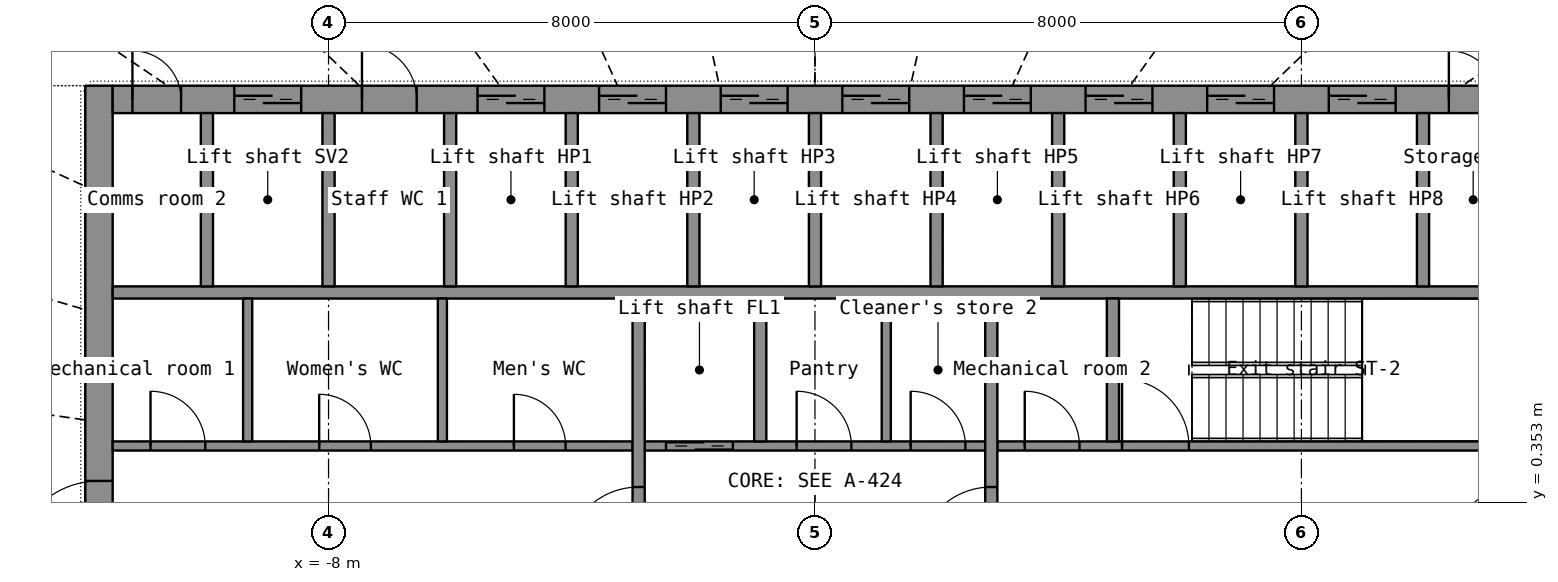
"""IFC4 building model, lengths in metres.
Left out: names, types, materials, properties, quantities, classifications, styles, units other than length and angle.
Written with IfcOpenShell. Run it as: python <this file> out.ifc"""

import sys

from ifc_helpers import new_model, si_unit, direction, frame, frame_2d, origin, place, context, subcontext, project, spatial, rectangle, extrude, element, fill, save


model = new_model("IFC4")
c1 = context("Model", 3, precision=1e-05, world=origin(), true_north=direction((0.0, 1.0)))
c2 = subcontext(c1, "Body", "Model", "MODEL_VIEW")
j1 = project(units=[si_unit("LENGTHUNIT", "METRE"), si_unit("PLANEANGLEUNIT", "RADIAN")], contexts=[c1])
p1 = place(None, origin())
s1 = spatial("IfcSite", under=j1, at=p1, CompositionType="ELEMENT")
p2 = place(p1, origin())
s2 = spatial("IfcBuilding", under=s1, at=p2, CompositionType="ELEMENT")
p3 = place(p2, frame((0.0, 0.0, 186.7)))
s3 = spatial("IfcBuildingStorey", under=s2, at=p3, CompositionType="ELEMENT", Elevation=186.7)
p4 = place(p3, frame((-11.775, -7.2, 0.0), z_axis=(0.0, 0.0, 1.0), x_axis=(0.0, 1.0, 0.0)))
e1 = element("IfcWall", 1, at=p4, inside=s3, PredefinedType="SHEAR", context=c2, shape_type="SweptSolid", body=[
    extrude(rectangle(XDim=14.4, YDim=0.45, at=frame_2d((7.2, 0.0))), origin(), (0.0, 0.0, 1.0), 3.3),
])
p5 = place(p4, frame((6.5, 0.0, 0.0)))
e2 = element("IfcOpeningElement", 2, at=p5, cuts=e1, PredefinedType="OPENING", context=c2, shape_type="SweptSolid", body=[
    extrude(rectangle(XDim=1.4, YDim=2.2, at=frame_2d((0.7, 1.1))), frame((0.0, 0.235, 0.0), z_axis=(0.0, -1.0, 0.0), x_axis=(1.0, 0.0, 0.0)), (0.0, 0.0, 1.0), 0.47),
])
p6 = place(p3, frame((-11.55, 6.975, 0.0), z_axis=(0.0, 0.0, 1.0), x_axis=(1.0, 0.0, 0.0)))
e3 = element("IfcWall", 3, at=p6, inside=s3, PredefinedType="SHEAR", context=c2, shape_type="SweptSolid", body=[
    extrude(rectangle(XDim=23.1, YDim=0.45, at=frame_2d((11.55, 0.0))), origin(), (0.0, 0.0, 1.0), 3.3),
])
p7 = place(p6, frame((2.0, 0.0, 0.0)))
e4 = element("IfcOpeningElement", 4, at=p7, cuts=e3, PredefinedType="OPENING", context=c2, shape_type="SweptSolid", body=[
    extrude(rectangle(XDim=1.1, YDim=2.2, at=frame_2d((0.55, 1.1))), frame((0.0, 0.235, 0.0), z_axis=(0.0, -1.0, 0.0), x_axis=(1.0, 0.0, 0.0)), (0.0, 0.0, 1.0), 0.47),
])
p8 = place(p6, frame((6.0, 0.0, 0.0)))
e5 = element("IfcOpeningElement", 5, at=p8, cuts=e3, PredefinedType="OPENING", context=c2, shape_type="SweptSolid", body=[
    extrude(rectangle(XDim=1.1, YDim=2.2, at=frame_2d((0.55, 1.1))), frame((0.0, 0.235, 0.0), z_axis=(0.0, -1.0, 0.0), x_axis=(1.0, 0.0, 0.0)), (0.0, 0.0, 1.0), 0.47),
])
p9 = place(p6, frame((8.0, 0.0, 0.0)))
e6 = element("IfcOpeningElement", 6, at=p9, cuts=e3, PredefinedType="OPENING", context=c2, shape_type="SweptSolid", body=[
    extrude(rectangle(XDim=1.1, YDim=2.2, at=frame_2d((0.55, 1.1))), frame((0.0, 0.235, 0.0), z_axis=(0.0, -1.0, 0.0), x_axis=(1.0, 0.0, 0.0)), (0.0, 0.0, 1.0), 0.47),
])
p10 = place(p6, frame((10.0, 0.0, 0.0)))
e7 = element("IfcOpeningElement", 7, at=p10, cuts=e3, PredefinedType="OPENING", context=c2, shape_type="SweptSolid", body=[
    extrude(rectangle(XDim=1.1, YDim=2.2, at=frame_2d((0.55, 1.1))), frame((0.0, 0.235, 0.0), z_axis=(0.0, -1.0, 0.0), x_axis=(1.0, 0.0, 0.0)), (0.0, 0.0, 1.0), 0.47),
])
p11 = place(p6, frame((12.0, 0.0, 0.0)))
e8 = element("IfcOpeningElement", 8, at=p11, cuts=e3, PredefinedType="OPENING", context=c2, shape_type="SweptSolid", body=[
    extrude(rectangle(XDim=1.1, YDim=2.2, at=frame_2d((0.55, 1.1))), frame((0.0, 0.235, 0.0), z_axis=(0.0, -1.0, 0.0), x_axis=(1.0, 0.0, 0.0)), (0.0, 0.0, 1.0), 0.47),
])
p12 = place(p6, frame((14.0, 0.0, 0.0)))
e9 = element("IfcOpeningElement", 9, at=p12, cuts=e3, PredefinedType="OPENING", context=c2, shape_type="SweptSolid", body=[
    extrude(rectangle(XDim=1.1, YDim=2.2, at=frame_2d((0.55, 1.1))), frame((0.0, 0.235, 0.0), z_axis=(0.0, -1.0, 0.0), x_axis=(1.0, 0.0, 0.0)), (0.0, 0.0, 1.0), 0.47),
])
p13 = place(p6, frame((16.0, 0.0, 0.0)))
e10 = element("IfcOpeningElement", 10, at=p13, cuts=e3, PredefinedType="OPENING", context=c2, shape_type="SweptSolid", body=[
    extrude(rectangle(XDim=1.1, YDim=2.2, at=frame_2d((0.55, 1.1))), frame((0.0, 0.235, 0.0), z_axis=(0.0, -1.0, 0.0), x_axis=(1.0, 0.0, 0.0)), (0.0, 0.0, 1.0), 0.47),
])
p14 = place(p6, frame((18.0, 0.0, 0.0)))
e11 = element("IfcOpeningElement", 11, at=p14, cuts=e3, PredefinedType="OPENING", context=c2, shape_type="SweptSolid", body=[
    extrude(rectangle(XDim=1.1, YDim=2.2, at=frame_2d((0.55, 1.1))), frame((0.0, 0.235, 0.0), z_axis=(0.0, -1.0, 0.0), x_axis=(1.0, 0.0, 0.0)), (0.0, 0.0, 1.0), 0.47),
])
p15 = place(p6, frame((20.0, 0.0, 0.0)))
e12 = element("IfcOpeningElement", 12, at=p15, cuts=e3, PredefinedType="OPENING", context=c2, shape_type="SweptSolid", body=[
    extrude(rectangle(XDim=1.1, YDim=2.2, at=frame_2d((0.55, 1.1))), frame((0.0, 0.235, 0.0), z_axis=(0.0, -1.0, 0.0), x_axis=(1.0, 0.0, 0.0)), (0.0, 0.0, 1.0), 0.47),
])
p16 = place(p6, frame((4.1, 0.0, 0.0)))
e13 = element("IfcOpeningElement", 13, at=p16, cuts=e3, PredefinedType="OPENING", context=c2, shape_type="SweptSolid", body=[
    extrude(rectangle(XDim=0.9, YDim=2.1, at=frame_2d((0.45, 1.05))), frame((0.0, 0.235, 0.0), z_axis=(0.0, -1.0, 0.0), x_axis=(1.0, 0.0, 0.0)), (0.0, 0.0, 1.0), 0.47),
])
p17 = place(p6, frame((0.325, 0.0, 0.0)))
e14 = element("IfcOpeningElement", 14, at=p17, cuts=e3, PredefinedType="OPENING", context=c2, shape_type="SweptSolid", body=[
    extrude(rectangle(XDim=0.8, YDim=2.05, at=frame_2d((0.4, 1.025))), frame((0.0, 0.235, 0.0), z_axis=(0.0, -1.0, 0.0), x_axis=(1.0, 0.0, 0.0)), (0.0, 0.0, 1.0), 0.47),
])
p18 = place(p6, frame((21.975, 0.0, 0.0)))
e15 = element("IfcOpeningElement", 15, at=p18, cuts=e3, PredefinedType="OPENING", context=c2, shape_type="SweptSolid", body=[
    extrude(rectangle(XDim=0.8, YDim=2.05, at=frame_2d((0.4, 1.025))), frame((0.0, 0.235, 0.0), z_axis=(0.0, -1.0, 0.0), x_axis=(1.0, 0.0, 0.0)), (0.0, 0.0, 1.0), 0.47),
])
p19 = place(p3, frame((-11.55, 3.8, 0.0), z_axis=(0.0, 0.0, 1.0), x_axis=(1.0, 0.0, 0.0)))
e16 = element("IfcWall", 16, at=p19, inside=s3, PredefinedType="SHEAR", context=c2, shape_type="SweptSolid", body=[
    extrude(rectangle(XDim=23.1, YDim=0.2, at=frame_2d((11.55, 0.0))), origin(), (0.0, 0.0, 1.0), 3.3),
])
for number, where, z_axis, x_axis in (
    (17, (-10.0, 3.9, 0.0), (0.0, 0.0, 1.0), (0.0, 1.0, 0.0)),
    (18, (-8.0, 3.9, 0.0), (0.0, 0.0, 1.0), (0.0, 1.0, 0.0)),
    (19, (-6.0, 3.9, 0.0), (0.0, 0.0, 1.0), (0.0, 1.0, 0.0)),
    (20, (-4.0, 3.9, 0.0), (0.0, 0.0, 1.0), (0.0, 1.0, 0.0)),
    (21, (-2.0, 3.9, 0.0), (0.0, 0.0, 1.0), (0.0, 1.0, 0.0)),
    (22, (0.0, 3.9, 0.0), (0.0, 0.0, 1.0), (0.0, 1.0, 0.0)),
    (23, (2.0, 3.9, 0.0), (0.0, 0.0, 1.0), (0.0, 1.0, 0.0)),
    (24, (4.0, 3.9, 0.0), (0.0, 0.0, 1.0), (0.0, 1.0, 0.0)),
    (25, (6.0, 3.9, 0.0), (0.0, 0.0, 1.0), (0.0, 1.0, 0.0)),
    (26, (8.0, 3.9, 0.0), (0.0, 0.0, 1.0), (0.0, 1.0, 0.0)),
    (27, (10.0, 3.9, 0.0), (0.0, 0.0, 1.0), (0.0, 1.0, 0.0)),
):
    element("IfcWall", number, at=place(p3, frame(where, z_axis=z_axis, x_axis=x_axis)), inside=s3, PredefinedType="SHEAR", context=c2, shape_type="SweptSolid", body=[
        extrude(rectangle(XDim=2.85, YDim=0.2, at=frame_2d((1.425, 0.0))), origin(), (0.0, 0.0, 1.0), 3.3),
    ])
p20 = place(p3, frame((-11.55, 1.275, 0.0), z_axis=(0.0, 0.0, 1.0), x_axis=(1.0, 0.0, 0.0)))
e28 = element("IfcWall", 28, at=p20, inside=s3, PredefinedType="PARTITIONING", context=c2, shape_type="SweptSolid", body=[
    extrude(rectangle(XDim=8.55, YDim=0.15, at=frame_2d((4.275, 0.0))), origin(), (0.0, 0.0, 1.0), 3.3),
])
p21 = place(p20, frame((0.623, 0.0, 0.0)))
e29 = element("IfcOpeningElement", 29, at=p21, cuts=e28, PredefinedType="OPENING", context=c2, shape_type="SweptSolid", body=[
    extrude(rectangle(XDim=0.9, YDim=2.1, at=frame_2d((0.45, 1.05))), frame((0.0, 0.085, 0.0), z_axis=(0.0, -1.0, 0.0), x_axis=(1.0, 0.0, 0.0)), (0.0, 0.0, 1.0), 0.17),
])
p22 = place(p20, frame((3.396, 0.0, 0.0)))
e30 = element("IfcOpeningElement", 30, at=p22, cuts=e28, PredefinedType="OPENING", context=c2, shape_type="SweptSolid", body=[
    extrude(rectangle(XDim=0.85, YDim=2.1, at=frame_2d((0.425, 1.05))), frame((0.0, 0.085, 0.0), z_axis=(0.0, -1.0, 0.0), x_axis=(1.0, 0.0, 0.0)), (0.0, 0.0, 1.0), 0.17),
])
p23 = place(p20, frame((6.599, 0.0, 0.0)))
e31 = element("IfcOpeningElement", 31, at=p23, cuts=e28, PredefinedType="OPENING", context=c2, shape_type="SweptSolid", body=[
    extrude(rectangle(XDim=0.85, YDim=2.1, at=frame_2d((0.425, 1.05))), frame((0.0, 0.085, 0.0), z_axis=(0.0, -1.0, 0.0), x_axis=(1.0, 0.0, 0.0)), (0.0, 0.0, 1.0), 0.17),
])
p24 = place(p3, frame((-2.8, 1.275, 0.0), z_axis=(0.0, 0.0, 1.0), x_axis=(1.0, 0.0, 0.0)))
e32 = element("IfcWall", 32, at=p24, inside=s3, PredefinedType="SHEAR", context=c2, shape_type="SweptSolid", body=[
    extrude(rectangle(XDim=5.6, YDim=0.15, at=frame_2d((2.8, 0.0))), origin(), (0.0, 0.0, 1.0), 3.3),
])
p25 = place(p24, frame((0.35, 0.0, 0.0)))
e33 = element("IfcOpeningElement", 33, at=p25, cuts=e32, PredefinedType="OPENING", context=c2, shape_type="SweptSolid", body=[
    extrude(rectangle(XDim=1.1, YDim=2.2, at=frame_2d((0.55, 1.1))), frame((0.0, 0.085, 0.0), z_axis=(0.0, -1.0, 0.0), x_axis=(1.0, 0.0, 0.0)), (0.0, 0.0, 1.0), 0.17),
])
p26 = place(p24, frame((2.499, 0.0, 0.0)))
e34 = element("IfcOpeningElement", 34, at=p26, cuts=e32, PredefinedType="OPENING", context=c2, shape_type="SweptSolid", body=[
    extrude(rectangle(XDim=0.9, YDim=2.1, at=frame_2d((0.45, 1.05))), frame((0.0, 0.085, 0.0), z_axis=(0.0, -1.0, 0.0), x_axis=(1.0, 0.0, 0.0)), (0.0, 0.0, 1.0), 0.17),
])
p27 = place(p24, frame((4.374, 0.0, 0.0)))
e35 = element("IfcOpeningElement", 35, at=p27, cuts=e32, PredefinedType="OPENING", context=c2, shape_type="SweptSolid", body=[
    extrude(rectangle(XDim=0.9, YDim=2.1, at=frame_2d((0.45, 1.05))), frame((0.0, 0.085, 0.0), z_axis=(0.0, -1.0, 0.0), x_axis=(1.0, 0.0, 0.0)), (0.0, 0.0, 1.0), 0.17),
])
p28 = place(p3, frame((3.0, 1.275, 0.0), z_axis=(0.0, 0.0, 1.0), x_axis=(1.0, 0.0, 0.0)))
e36 = element("IfcWall", 36, at=p28, inside=s3, PredefinedType="SHEAR", context=c2, shape_type="SweptSolid", body=[
    extrude(rectangle(XDim=8.55, YDim=0.15, at=frame_2d((4.275, 0.0))), origin(), (0.0, 0.0, 1.0), 3.3),
])
p29 = place(p28, frame((2.05, 0.0, 0.0)))
e37 = element("IfcOpeningElement", 37, at=p29, cuts=e36, PredefinedType="OPENING", context=c2, shape_type="SweptSolid", body=[
    extrude(rectangle(XDim=1.1, YDim=2.15, at=frame_2d((0.55, 1.075))), frame((0.0, 0.085, 0.0), z_axis=(0.0, -1.0, 0.0), x_axis=(1.0, 0.0, 0.0)), (0.0, 0.0, 1.0), 0.17),
])
p30 = place(p28, frame((0.45, 0.0, 0.0)))
e38 = element("IfcOpeningElement", 38, at=p30, cuts=e36, PredefinedType="OPENING", context=c2, shape_type="SweptSolid", body=[
    extrude(rectangle(XDim=0.9, YDim=2.1, at=frame_2d((0.45, 1.05))), frame((0.0, 0.085, 0.0), z_axis=(0.0, -1.0, 0.0), x_axis=(1.0, 0.0, 0.0)), (0.0, 0.0, 1.0), 0.17),
])
p31 = place(p3, frame((-2.9, -3.7, 0.0), z_axis=(0.0, 0.0, 1.0), x_axis=(0.0, 1.0, 0.0)))
e39 = element("IfcWall", 39, at=p31, inside=s3, PredefinedType="SHEAR", context=c2, shape_type="SweptSolid", body=[
    extrude(rectangle(XDim=7.4, YDim=0.2, at=frame_2d((3.7, 0.0))), origin(), (0.0, 0.0, 1.0), 3.3),
])
p32 = place(p31, frame((3.1, 0.0, 0.0)))
e40 = element("IfcOpeningElement", 40, at=p32, cuts=e39, PredefinedType="OPENING", context=c2, shape_type="SweptSolid", body=[
    extrude(rectangle(XDim=1.2, YDim=2.2, at=frame_2d((0.6, 1.1))), frame((0.0, 0.11, 0.0), z_axis=(0.0, -1.0, 0.0), x_axis=(1.0, 0.0, 0.0)), (0.0, 0.0, 1.0), 0.22),
])
p33 = place(p3, frame((2.9, -3.7, 0.0), z_axis=(0.0, 0.0, 1.0), x_axis=(0.0, 1.0, 0.0)))
e41 = element("IfcWall", 41, at=p33, inside=s3, PredefinedType="SHEAR", context=c2, shape_type="SweptSolid", body=[
    extrude(rectangle(XDim=7.4, YDim=0.2, at=frame_2d((3.7, 0.0))), origin(), (0.0, 0.0, 1.0), 3.3),
])
p34 = place(p33, frame((3.1, 0.0, 0.0)))
e42 = element("IfcOpeningElement", 42, at=p34, cuts=e41, PredefinedType="OPENING", context=c2, shape_type="SweptSolid", body=[
    extrude(rectangle(XDim=1.2, YDim=2.2, at=frame_2d((0.6, 1.1))), frame((0.0, 0.11, 0.0), z_axis=(0.0, -1.0, 0.0), x_axis=(1.0, 0.0, 0.0)), (0.0, 0.0, 1.0), 0.22),
])
for number, where, z_axis, x_axis in (
    (43, (-0.9, 1.35, 0.0), (0.0, 0.0, 1.0), (0.0, 1.0, 0.0)),
    (44, (4.9, 1.35, 0.0), (0.0, 0.0, 1.0), (0.0, 1.0, 0.0)),
):
    element("IfcWall", number, at=place(p3, frame(where, z_axis=z_axis, x_axis=x_axis)), inside=s3, PredefinedType="SHEAR", context=c2, shape_type="SweptSolid", body=[
        extrude(rectangle(XDim=2.35, YDim=0.2, at=frame_2d((1.175, 0.0))), origin(), (0.0, 0.0, 1.0), 3.3),
    ])
for number, where, z_axis, x_axis in (
    (45, (-9.33, 1.35, 0.0), (0.0, 0.0, 1.0), (0.0, 1.0, 0.0)),
    (46, (-6.127, 1.35, 0.0), (0.0, 0.0, 1.0), (0.0, 1.0, 0.0)),
    (47, (1.173, 1.35, 0.0), (0.0, 0.0, 1.0), (0.0, 1.0, 0.0)),
):
    element("IfcWall", number, at=place(p3, frame(where, z_axis=z_axis, x_axis=x_axis)), inside=s3, PredefinedType="PARTITIONING", context=c2, shape_type="SweptSolid", body=[
        extrude(rectangle(XDim=2.35, YDim=0.15, at=frame_2d((1.175, 0.0))), origin(), (0.0, 0.0, 1.0), 3.3),
    ])
p35 = place(p7, origin())
e48 = element("IfcDoor", 48, at=p35, inside=s3, OperationType="DOUBLE_DOOR_SLIDING", PredefinedType="DOOR", context=c2, shape_type="SweptSolid", body=[
    extrude(rectangle(XDim=1.1, YDim=2.2, at=frame_2d((0.55, 1.1))), frame((0.0, 0.025, 0.0), z_axis=(0.0, -1.0, 0.0), x_axis=(1.0, 0.0, 0.0)), (0.0, 0.0, 1.0), 0.05),
])
fill(e4, e48)
p36 = place(p8, origin())
e49 = element("IfcDoor", 49, at=p36, inside=s3, OperationType="DOUBLE_DOOR_SLIDING", PredefinedType="DOOR", context=c2, shape_type="SweptSolid", body=[
    extrude(rectangle(XDim=1.1, YDim=2.2, at=frame_2d((0.55, 1.1))), frame((0.0, 0.025, 0.0), z_axis=(0.0, -1.0, 0.0), x_axis=(1.0, 0.0, 0.0)), (0.0, 0.0, 1.0), 0.05),
])
fill(e5, e49)
p37 = place(p9, origin())
e50 = element("IfcDoor", 50, at=p37, inside=s3, OperationType="DOUBLE_DOOR_SLIDING", PredefinedType="DOOR", context=c2, shape_type="SweptSolid", body=[
    extrude(rectangle(XDim=1.1, YDim=2.2, at=frame_2d((0.55, 1.1))), frame((0.0, 0.025, 0.0), z_axis=(0.0, -1.0, 0.0), x_axis=(1.0, 0.0, 0.0)), (0.0, 0.0, 1.0), 0.05),
])
fill(e6, e50)
p38 = place(p10, origin())
e51 = element("IfcDoor", 51, at=p38, inside=s3, OperationType="DOUBLE_DOOR_SLIDING", PredefinedType="DOOR", context=c2, shape_type="SweptSolid", body=[
    extrude(rectangle(XDim=1.1, YDim=2.2, at=frame_2d((0.55, 1.1))), frame((0.0, 0.025, 0.0), z_axis=(0.0, -1.0, 0.0), x_axis=(1.0, 0.0, 0.0)), (0.0, 0.0, 1.0), 0.05),
])
fill(e7, e51)
p39 = place(p11, origin())
e52 = element("IfcDoor", 52, at=p39, inside=s3, OperationType="DOUBLE_DOOR_SLIDING", PredefinedType="DOOR", context=c2, shape_type="SweptSolid", body=[
    extrude(rectangle(XDim=1.1, YDim=2.2, at=frame_2d((0.55, 1.1))), frame((0.0, 0.025, 0.0), z_axis=(0.0, -1.0, 0.0), x_axis=(1.0, 0.0, 0.0)), (0.0, 0.0, 1.0), 0.05),
])
fill(e8, e52)
p40 = place(p12, origin())
e53 = element("IfcDoor", 53, at=p40, inside=s3, OperationType="DOUBLE_DOOR_SLIDING", PredefinedType="DOOR", context=c2, shape_type="SweptSolid", body=[
    extrude(rectangle(XDim=1.1, YDim=2.2, at=frame_2d((0.55, 1.1))), frame((0.0, 0.025, 0.0), z_axis=(0.0, -1.0, 0.0), x_axis=(1.0, 0.0, 0.0)), (0.0, 0.0, 1.0), 0.05),
])
fill(e9, e53)
p41 = place(p13, origin())
e54 = element("IfcDoor", 54, at=p41, inside=s3, OperationType="DOUBLE_DOOR_SLIDING", PredefinedType="DOOR", context=c2, shape_type="SweptSolid", body=[
    extrude(rectangle(XDim=1.1, YDim=2.2, at=frame_2d((0.55, 1.1))), frame((0.0, 0.025, 0.0), z_axis=(0.0, -1.0, 0.0), x_axis=(1.0, 0.0, 0.0)), (0.0, 0.0, 1.0), 0.05),
])
fill(e10, e54)
p42 = place(p14, origin())
e55 = element("IfcDoor", 55, at=p42, inside=s3, OperationType="DOUBLE_DOOR_SLIDING", PredefinedType="DOOR", context=c2, shape_type="SweptSolid", body=[
    extrude(rectangle(XDim=1.1, YDim=2.2, at=frame_2d((0.55, 1.1))), frame((0.0, 0.025, 0.0), z_axis=(0.0, -1.0, 0.0), x_axis=(1.0, 0.0, 0.0)), (0.0, 0.0, 1.0), 0.05),
])
fill(e11, e55)
p43 = place(p15, origin())
e56 = element("IfcDoor", 56, at=p43, inside=s3, OperationType="DOUBLE_DOOR_SLIDING", PredefinedType="DOOR", context=c2, shape_type="SweptSolid", body=[
    extrude(rectangle(XDim=1.1, YDim=2.2, at=frame_2d((0.55, 1.1))), frame((0.0, 0.025, 0.0), z_axis=(0.0, -1.0, 0.0), x_axis=(1.0, 0.0, 0.0)), (0.0, 0.0, 1.0), 0.05),
])
fill(e12, e56)
p44 = place(p16, origin())
e57 = element("IfcDoor", 57, at=p44, inside=s3, OperationType="SINGLE_SWING_LEFT", PredefinedType="DOOR", context=c2, shape_type="SweptSolid", body=[
    extrude(rectangle(XDim=0.9, YDim=2.1, at=frame_2d((0.45, 1.05))), frame((0.0, 0.025, 0.0), z_axis=(0.0, -1.0, 0.0), x_axis=(1.0, 0.0, 0.0)), (0.0, 0.0, 1.0), 0.05),
])
fill(e13, e57)
p45 = place(p17, origin())
e58 = element("IfcDoor", 58, at=p45, inside=s3, OperationType="SINGLE_SWING_LEFT", PredefinedType="DOOR", context=c2, shape_type="SweptSolid", body=[
    extrude(rectangle(XDim=0.8, YDim=2.05, at=frame_2d((0.4, 1.025))), frame((0.0, 0.025, 0.0), z_axis=(0.0, -1.0, 0.0), x_axis=(1.0, 0.0, 0.0)), (0.0, 0.0, 1.0), 0.05),
])
fill(e14, e58)
p46 = place(p18, origin())
e59 = element("IfcDoor", 59, at=p46, inside=s3, OperationType="SINGLE_SWING_LEFT", PredefinedType="DOOR", context=c2, shape_type="SweptSolid", body=[
    extrude(rectangle(XDim=0.8, YDim=2.05, at=frame_2d((0.4, 1.025))), frame((0.0, 0.025, 0.0), z_axis=(0.0, -1.0, 0.0), x_axis=(1.0, 0.0, 0.0)), (0.0, 0.0, 1.0), 0.05),
])
fill(e15, e59)
p47 = place(p5, origin())
e60 = element("IfcDoor", 60, at=p47, inside=s3, OperationType="DOUBLE_DOOR_SINGLE_SWING", PredefinedType="DOOR", context=c2, shape_type="SweptSolid", body=[
    extrude(rectangle(XDim=1.4, YDim=2.2, at=frame_2d((0.7, 1.1))), frame((0.0, 0.025, 0.0), z_axis=(0.0, -1.0, 0.0), x_axis=(1.0, 0.0, 0.0)), (0.0, 0.0, 1.0), 0.05),
])
fill(e2, e60)
p48 = place(p32, origin())
e61 = element("IfcDoor", 61, at=p48, inside=s3, OperationType="SINGLE_SWING_LEFT", PredefinedType="DOOR", context=c2, shape_type="SweptSolid", body=[
    extrude(rectangle(XDim=1.2, YDim=2.2, at=frame_2d((0.6, 1.1))), frame((0.0, 0.025, 0.0), z_axis=(0.0, -1.0, 0.0), x_axis=(1.0, 0.0, 0.0)), (0.0, 0.0, 1.0), 0.05),
])
fill(e40, e61)
p49 = place(p34, origin())
e62 = element("IfcDoor", 62, at=p49, inside=s3, OperationType="SINGLE_SWING_LEFT", PredefinedType="DOOR", context=c2, shape_type="SweptSolid", body=[
    extrude(rectangle(XDim=1.2, YDim=2.2, at=frame_2d((0.6, 1.1))), frame((0.0, 0.025, 0.0), z_axis=(0.0, -1.0, 0.0), x_axis=(1.0, 0.0, 0.0)), (0.0, 0.0, 1.0), 0.05),
])
fill(e42, e62)
p50 = place(p25, origin())
e63 = element("IfcDoor", 63, at=p50, inside=s3, OperationType="DOUBLE_DOOR_SLIDING", PredefinedType="DOOR", context=c2, shape_type="SweptSolid", body=[
    extrude(rectangle(XDim=1.1, YDim=2.2, at=frame_2d((0.55, 1.1))), frame((0.0, 0.025, 0.0), z_axis=(0.0, -1.0, 0.0), x_axis=(1.0, 0.0, 0.0)), (0.0, 0.0, 1.0), 0.05),
])
fill(e33, e63)
p51 = place(p29, origin())
e64 = element("IfcDoor", 64, at=p51, inside=s3, OperationType="SINGLE_SWING_LEFT", PredefinedType="DOOR", context=c2, shape_type="SweptSolid", body=[
    extrude(rectangle(XDim=1.1, YDim=2.15, at=frame_2d((0.55, 1.075))), frame((0.0, 0.025, 0.0), z_axis=(0.0, -1.0, 0.0), x_axis=(1.0, 0.0, 0.0)), (0.0, 0.0, 1.0), 0.05),
])
fill(e37, e64)
p52 = place(p21, origin())
e65 = element("IfcDoor", 65, at=p52, inside=s3, OperationType="SINGLE_SWING_LEFT", PredefinedType="DOOR", context=c2, shape_type="SweptSolid", body=[
    extrude(rectangle(XDim=0.9, YDim=2.1, at=frame_2d((0.45, 1.05))), frame((0.0, 0.025, 0.0), z_axis=(0.0, -1.0, 0.0), x_axis=(1.0, 0.0, 0.0)), (0.0, 0.0, 1.0), 0.05),
])
fill(e29, e65)
p53 = place(p22, origin())
e66 = element("IfcDoor", 66, at=p53, inside=s3, OperationType="SINGLE_SWING_LEFT", PredefinedType="DOOR", context=c2, shape_type="SweptSolid", body=[
    extrude(rectangle(XDim=0.85, YDim=2.1, at=frame_2d((0.425, 1.05))), frame((0.0, 0.025, 0.0), z_axis=(0.0, -1.0, 0.0), x_axis=(1.0, 0.0, 0.0)), (0.0, 0.0, 1.0), 0.05),
])
fill(e30, e66)
p54 = place(p23, origin())
e67 = element("IfcDoor", 67, at=p54, inside=s3, OperationType="SINGLE_SWING_LEFT", PredefinedType="DOOR", context=c2, shape_type="SweptSolid", body=[
    extrude(rectangle(XDim=0.85, YDim=2.1, at=frame_2d((0.425, 1.05))), frame((0.0, 0.025, 0.0), z_axis=(0.0, -1.0, 0.0), x_axis=(1.0, 0.0, 0.0)), (0.0, 0.0, 1.0), 0.05),
])
fill(e31, e67)
p55 = place(p26, origin())
e68 = element("IfcDoor", 68, at=p55, inside=s3, OperationType="SINGLE_SWING_LEFT", PredefinedType="DOOR", context=c2, shape_type="SweptSolid", body=[
    extrude(rectangle(XDim=0.9, YDim=2.1, at=frame_2d((0.45, 1.05))), frame((0.0, 0.025, 0.0), z_axis=(0.0, -1.0, 0.0), x_axis=(1.0, 0.0, 0.0)), (0.0, 0.0, 1.0), 0.05),
])
fill(e34, e68)
p56 = place(p27, origin())
e69 = element("IfcDoor", 69, at=p56, inside=s3, OperationType="SINGLE_SWING_LEFT", PredefinedType="DOOR", context=c2, shape_type="SweptSolid", body=[
    extrude(rectangle(XDim=0.9, YDim=2.1, at=frame_2d((0.45, 1.05))), frame((0.0, 0.025, 0.0), z_axis=(0.0, -1.0, 0.0), x_axis=(1.0, 0.0, 0.0)), (0.0, 0.0, 1.0), 0.05),
])
fill(e35, e69)
p57 = place(p30, origin())
e70 = element("IfcDoor", 70, at=p57, inside=s3, OperationType="SINGLE_SWING_LEFT", PredefinedType="DOOR", context=c2, shape_type="SweptSolid", body=[
    extrude(rectangle(XDim=0.9, YDim=2.1, at=frame_2d((0.45, 1.05))), frame((0.0, 0.025, 0.0), z_axis=(0.0, -1.0, 0.0), x_axis=(1.0, 0.0, 0.0)), (0.0, 0.0, 1.0), 0.05),
])
fill(e38, e70)
save(model, sys.argv[1])
